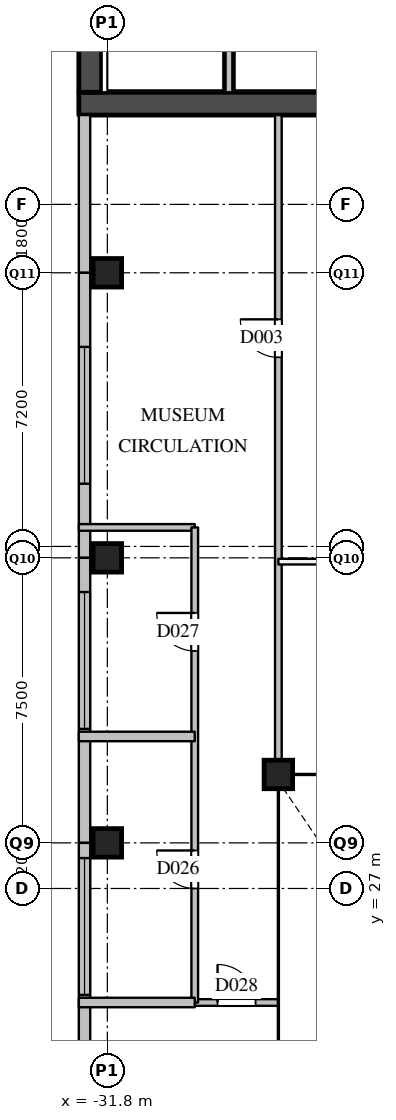
"""IFC4 building model, lengths in metres.
Left out: names, types, materials, properties, quantities, classifications, styles, units other than length and angle.
Written with IfcOpenShell. Run it as: python <this file> out.ifc"""

import sys

from ifc_helpers import new_model, si_unit, direction, frame, frame_2d, origin, origin_2d, place, context, subcontext, project, spatial, rectangle, extrude, element, fill, save


model = new_model("IFC4")
c1 = context("Model", 3, precision=1e-05, world=origin(), true_north=direction((0.0, 1.0)))
c2 = subcontext(c1, "Body", "Model", "MODEL_VIEW")
j1 = project(units=[si_unit("LENGTHUNIT", "METRE"), si_unit("PLANEANGLEUNIT", "RADIAN")], contexts=[c1])
p1 = place(None, origin())
s1 = spatial("IfcSite", under=j1, at=p1, CompositionType="ELEMENT")
p2 = place(p1, origin())
s2 = spatial("IfcBuilding", under=s1, at=p2, CompositionType="ELEMENT")
p3 = place(p2, frame((0.0, 0.0, 21.0)))
s3 = spatial("IfcBuildingStorey", under=s2, at=p3, CompositionType="ELEMENT", Elevation=21.0)
for number, where, z_axis, x_axis in (
    (1, (-31.8, 28.2, 0.0), (0.0, 0.0, 1.0), (1.0, 0.0, 0.0)),
    (2, (-31.8, 35.7, 0.0), (0.0, 0.0, 1.0), (1.0, 0.0, 0.0)),
    (3, (-31.8, 43.2, 0.0), (0.0, 0.0, 1.0), (1.0, 0.0, 0.0)),
    (4, (-27.3, 30.0, 0.0), (0.0, 0.0, 1.0), (1.0, 0.0, 0.0)),
):
    element("IfcColumn", number, at=place(p3, frame(where, z_axis=z_axis, x_axis=x_axis)), inside=s3, PredefinedType="COLUMN", context=c2, shape_type="SweptSolid", body=[
        extrude(rectangle(XDim=0.75, YDim=0.75, at=origin_2d()), origin(), (0.0, 0.0, 1.0), 5.0),
    ])
p4 = place(p3, frame((-32.4, 47.35, 0.0), z_axis=(0.0, 0.0, 1.0), x_axis=(0.0, -1.0, 0.0)))
e5 = element("IfcWall", 5, at=p4, inside=s3, PredefinedType="SOLIDWALL", context=c2, shape_type="SweptSolid", body=[
    extrude(rectangle(XDim=4.15, YDim=0.3, at=frame_2d((2.075, 0.0))), origin(), (0.0, 0.0, 1.0), 4.59),
])
p5 = place(p3, frame((-32.4, 43.2, 0.0), z_axis=(0.0, 0.0, 1.0), x_axis=(0.0, -1.0, 0.0)))
e6 = element("IfcWall", 6, at=p5, inside=s3, PredefinedType="SOLIDWALL", context=c2, shape_type="SweptSolid", body=[
    extrude(rectangle(XDim=7.5, YDim=0.3, at=frame_2d((3.75, 0.0))), origin(), (0.0, 0.0, 1.0), 4.59),
])
p6 = place(p5, frame((1.95, 0.0, 2.4)))
e7 = element("IfcOpeningElement", 7, at=p6, cuts=e6, PredefinedType="OPENING", context=c2, shape_type="SweptSolid", body=[
    extrude(rectangle(XDim=3.6, YDim=1.2, at=frame_2d((1.8, 0.6))), frame((0.0, 0.16, 0.0), z_axis=(0.0, -1.0, 0.0), x_axis=(1.0, 0.0, 0.0)), (0.0, 0.0, 1.0), 0.32),
])
p7 = place(p3, frame((-32.4, 35.7, 0.0), z_axis=(0.0, 0.0, 1.0), x_axis=(0.0, -1.0, 0.0)))
e8 = element("IfcWall", 8, at=p7, inside=s3, PredefinedType="SOLIDWALL", context=c2, shape_type="SweptSolid", body=[
    extrude(rectangle(XDim=7.5, YDim=0.3, at=frame_2d((3.75, 0.0))), origin(), (0.0, 0.0, 1.0), 4.59),
])
p8 = place(p7, frame((0.9, 0.0, 2.4)))
e9 = element("IfcOpeningElement", 9, at=p8, cuts=e8, PredefinedType="OPENING", context=c2, shape_type="SweptSolid", body=[
    extrude(rectangle(XDim=3.6, YDim=1.2, at=frame_2d((1.8, 0.6))), frame((0.0, 0.16, 0.0), z_axis=(0.0, -1.0, 0.0), x_axis=(1.0, 0.0, 0.0)), (0.0, 0.0, 1.0), 0.32),
])
p9 = place(p3, frame((-32.4, 28.2, 0.0), z_axis=(0.0, 0.0, 1.0), x_axis=(0.0, -1.0, 0.0)))
e10 = element("IfcWall", 10, at=p9, inside=s3, PredefinedType="SOLIDWALL", context=c2, shape_type="SweptSolid", body=[
    extrude(rectangle(XDim=7.5, YDim=0.3, at=frame_2d((3.75, 0.0))), origin(), (0.0, 0.0, 1.0), 4.59),
])
p10 = place(p9, frame((0.4, 0.0, 2.4)))
e11 = element("IfcOpeningElement", 11, at=p10, cuts=e10, PredefinedType="OPENING", context=c2, shape_type="SweptSolid", body=[
    extrude(rectangle(XDim=3.6, YDim=1.2, at=frame_2d((1.8, 0.6))), frame((0.0, 0.16, 0.0), z_axis=(0.0, -1.0, 0.0), x_axis=(1.0, 0.0, 0.0)), (0.0, 0.0, 1.0), 0.32),
])
p11 = place(p3, frame((-32.55, 47.65, 0.0), z_axis=(0.0, 0.0, 1.0), x_axis=(1.0, 0.0, 0.0)))
e12 = element("IfcWall", 12, at=p11, inside=s3, PredefinedType="SHEAR", context=c2, shape_type="SweptSolid", body=[
    extrude(rectangle(XDim=12.2, YDim=0.6, at=frame_2d((6.1, 0.0))), origin(), (0.0, 0.0, 1.0), 4.55),
])
p12 = place(p11, frame((8.0, 0.0, 0.0)))
e13 = element("IfcOpeningElement", 13, at=p12, cuts=e12, PredefinedType="OPENING", context=c2, shape_type="SweptSolid", body=[
    extrude(rectangle(XDim=0.7, YDim=2.1, at=frame_2d((0.35, 1.05))), frame((0.0, 0.31, 0.0), z_axis=(0.0, -1.0, 0.0), x_axis=(1.0, 0.0, 0.0)), (0.0, 0.0, 1.0), 0.62),
])
p13 = place(p3, frame((-32.25, 47.95, 0.0), z_axis=(0.0, 0.0, 1.0), x_axis=(0.0, 1.0, 0.0)))
e14 = element("IfcWall", 14, at=p13, inside=s3, PredefinedType="SHEAR", context=c2, shape_type="SweptSolid", body=[
    extrude(rectangle(XDim=10.4, YDim=0.6, at=frame_2d((5.2, 0.0))), origin(), (0.0, 0.0, 1.0), 4.55),
])
p14 = place(p3, frame((-28.6, 47.95, 0.0), z_axis=(0.0, 0.0, 1.0), x_axis=(0.0, 1.0, 0.0)))
e15 = element("IfcWall", 15, at=p14, inside=s3, PredefinedType="SOLIDWALL", context=c2, shape_type="SweptSolid", body=[
    extrude(rectangle(XDim=2.08, YDim=0.2, at=frame_2d((1.04, 0.0))), origin(), (0.0, 0.0, 1.0), 4.55),
])
p15 = place(p3, frame((-29.5, 24.0, 0.0), z_axis=(0.0, 0.0, 1.0), x_axis=(1.0, 0.0, 0.0)))
e16 = element("IfcWall", 16, at=p15, inside=s3, PredefinedType="PARTITIONING", context=c2, shape_type="SweptSolid", body=[
    extrude(rectangle(XDim=2.2, YDim=0.175, at=frame_2d((1.1, 0.0))), origin(), (0.0, 0.0, 1.0), 4.55),
])
p16 = place(p15, frame((0.6, 0.0, 0.0)))
e17 = element("IfcOpeningElement", 17, at=p16, cuts=e16, PredefinedType="OPENING", context=c2, shape_type="SweptSolid", body=[
    extrude(rectangle(XDim=1.0, YDim=2.1, at=frame_2d((0.5, 1.05))), frame((0.0, 0.097, 0.0), z_axis=(0.0, -1.0, 0.0), x_axis=(1.0, 0.0, 0.0)), (0.0, 0.0, 1.0), 0.195),
])
p17 = place(p3, frame((-32.55, 36.5, 0.0), z_axis=(0.0, 0.0, 1.0), x_axis=(1.0, 0.0, 0.0)))
e18 = element("IfcWall", 18, at=p17, inside=s3, PredefinedType="PARTITIONING", context=c2, shape_type="SweptSolid", body=[
    extrude(rectangle(XDim=3.05, YDim=0.175, at=frame_2d((1.525, 0.0))), origin(), (0.0, 0.0, 1.0), 3.79),
])
p18 = place(p3, frame((-29.5, 24.0, 0.0), z_axis=(0.0, 0.0, 1.0), x_axis=(0.0, 1.0, 0.0)))
e19 = element("IfcWall", 19, at=p18, inside=s3, PredefinedType="PARTITIONING", context=c2, shape_type="SweptSolid", body=[
    extrude(rectangle(XDim=12.5, YDim=0.175, at=frame_2d((6.25, 0.0))), origin(), (0.0, 0.0, 1.0), 3.79),
])
p19 = place(p18, frame((3.0, 0.0, 0.0)))
e20 = element("IfcOpeningElement", 20, at=p19, cuts=e19, PredefinedType="OPENING", context=c2, shape_type="SweptSolid", body=[
    extrude(rectangle(XDim=1.0, YDim=2.1, at=frame_2d((0.5, 1.05))), frame((0.0, 0.097, 0.0), z_axis=(0.0, -1.0, 0.0), x_axis=(1.0, 0.0, 0.0)), (0.0, 0.0, 1.0), 0.195),
])
p20 = place(p18, frame((9.25, 0.0, 0.0)))
e21 = element("IfcOpeningElement", 21, at=p20, cuts=e19, PredefinedType="OPENING", context=c2, shape_type="SweptSolid", body=[
    extrude(rectangle(XDim=1.0, YDim=2.1, at=frame_2d((0.5, 1.05))), frame((0.0, 0.097, 0.0), z_axis=(0.0, -1.0, 0.0), x_axis=(1.0, 0.0, 0.0)), (0.0, 0.0, 1.0), 0.195),
])
p21 = place(p3, frame((-27.3, 30.0, 0.0), z_axis=(0.0, 0.0, 1.0), x_axis=(0.0, 1.0, 0.0)))
e22 = element("IfcWall", 22, at=p21, inside=s3, PredefinedType="PARTITIONING", context=c2, shape_type="SweptSolid", body=[
    extrude(rectangle(XDim=17.35, YDim=0.175, at=frame_2d((8.675, 0.0))), origin(), (0.0, 0.0, 1.0), 3.79),
])
p22 = place(p21, frame((10.975, 0.0, 0.0)))
e23 = element("IfcOpeningElement", 23, at=p22, cuts=e22, PredefinedType="OPENING", context=c2, shape_type="SweptSolid", body=[
    extrude(rectangle(XDim=1.0, YDim=2.1, at=frame_2d((0.5, 1.05))), frame((0.0, 0.097, 0.0), z_axis=(0.0, -1.0, 0.0), x_axis=(1.0, 0.0, 0.0)), (0.0, 0.0, 1.0), 0.195),
])
p23 = place(p3, frame((-27.3, 35.6, 0.0), z_axis=(0.0, 0.0, 1.0), x_axis=(1.0, 0.0, 0.0)))
e24 = element("IfcWall", 24, at=p23, inside=s3, PredefinedType="PARTITIONING", context=c2, shape_type="SweptSolid", body=[
    extrude(rectangle(XDim=23.25, YDim=0.15, at=frame_2d((11.625, 0.0))), origin(), (0.0, 0.0, 1.0), 3.79),
])
p24 = place(p23, frame((4.85, 0.0, 0.0)))
e25 = element("IfcOpeningElement", 25, at=p24, cuts=e24, PredefinedType="OPENING", context=c2, shape_type="SweptSolid", body=[
    extrude(rectangle(XDim=1.8, YDim=2.1, at=frame_2d((0.9, 1.05))), frame((0.0, 0.085, 0.0), z_axis=(0.0, -1.0, 0.0), x_axis=(1.0, 0.0, 0.0)), (0.0, 0.0, 1.0), 0.17),
])
for number, where, z_axis, x_axis in (
    (26, (-32.55, 24.0, 0.0), (0.0, 0.0, 1.0), (1.0, 0.0, 0.0)),
    (27, (-32.55, 31.0, 0.0), (0.0, 0.0, 1.0), (1.0, 0.0, 0.0)),
):
    element("IfcWall", number, at=place(p3, frame(where, z_axis=z_axis, x_axis=x_axis)), inside=s3, PredefinedType="PARTITIONING", context=c2, shape_type="SweptSolid", body=[
        extrude(rectangle(XDim=3.05, YDim=0.25, at=frame_2d((1.525, 0.0))), origin(), (0.0, 0.0, 1.0), 3.79),
    ])
p25 = place(p6, origin())
e28 = element("IfcWindow", 28, at=p25, inside=s3, PartitioningType="SINGLE_PANEL", PredefinedType="WINDOW", context=c2, shape_type="SweptSolid", body=[
    extrude(rectangle(XDim=3.6, YDim=1.2, at=frame_2d((1.8, 0.6))), frame((0.0, 0.03, 0.0), z_axis=(0.0, -1.0, 0.0), x_axis=(1.0, 0.0, 0.0)), (0.0, 0.0, 1.0), 0.06),
])
fill(e7, e28)
p26 = place(p8, origin())
e29 = element("IfcWindow", 29, at=p26, inside=s3, PartitioningType="SINGLE_PANEL", PredefinedType="WINDOW", context=c2, shape_type="SweptSolid", body=[
    extrude(rectangle(XDim=3.6, YDim=1.2, at=frame_2d((1.8, 0.6))), frame((0.0, 0.03, 0.0), z_axis=(0.0, -1.0, 0.0), x_axis=(1.0, 0.0, 0.0)), (0.0, 0.0, 1.0), 0.06),
])
fill(e9, e29)
p27 = place(p10, origin())
e30 = element("IfcWindow", 30, at=p27, inside=s3, PartitioningType="SINGLE_PANEL", PredefinedType="WINDOW", context=c2, shape_type="SweptSolid", body=[
    extrude(rectangle(XDim=3.6, YDim=1.2, at=frame_2d((1.8, 0.6))), frame((0.0, 0.03, 0.0), z_axis=(0.0, -1.0, 0.0), x_axis=(1.0, 0.0, 0.0)), (0.0, 0.0, 1.0), 0.06),
])
fill(e11, e30)
p28 = place(p22, origin())
e31 = element("IfcDoor", 31, at=p28, inside=s3, OperationType="SINGLE_SWING_RIGHT", PredefinedType="DOOR", context=c2, shape_type="SweptSolid", body=[
    extrude(rectangle(XDim=1.0, YDim=2.1, at=frame_2d((0.5, 1.05))), frame((0.0, 0.025, 0.0), z_axis=(0.0, -1.0, 0.0), x_axis=(1.0, 0.0, 0.0)), (0.0, 0.0, 1.0), 0.05),
])
fill(e23, e31)
p29 = place(p19, origin())
e32 = element("IfcDoor", 32, at=p29, inside=s3, OperationType="SINGLE_SWING_RIGHT", PredefinedType="DOOR", context=c2, shape_type="SweptSolid", body=[
    extrude(rectangle(XDim=1.0, YDim=2.1, at=frame_2d((0.5, 1.05))), frame((0.0, 0.025, 0.0), z_axis=(0.0, -1.0, 0.0), x_axis=(1.0, 0.0, 0.0)), (0.0, 0.0, 1.0), 0.05),
])
fill(e20, e32)
p30 = place(p20, origin())
e33 = element("IfcDoor", 33, at=p30, inside=s3, OperationType="SINGLE_SWING_RIGHT", PredefinedType="DOOR", context=c2, shape_type="SweptSolid", body=[
    extrude(rectangle(XDim=1.0, YDim=2.1, at=frame_2d((0.5, 1.05))), frame((0.0, 0.025, 0.0), z_axis=(0.0, -1.0, 0.0), x_axis=(1.0, 0.0, 0.0)), (0.0, 0.0, 1.0), 0.05),
])
fill(e21, e33)
p31 = place(p16, origin())
e34 = element("IfcDoor", 34, at=p31, inside=s3, OperationType="SINGLE_SWING_LEFT", PredefinedType="DOOR", context=c2, shape_type="SweptSolid", body=[
    extrude(rectangle(XDim=1.0, YDim=2.1, at=frame_2d((0.5, 1.05))), frame((0.0, 0.025, 0.0), z_axis=(0.0, -1.0, 0.0), x_axis=(1.0, 0.0, 0.0)), (0.0, 0.0, 1.0), 0.05),
])
fill(e17, e34)
save(model, sys.argv[1])
